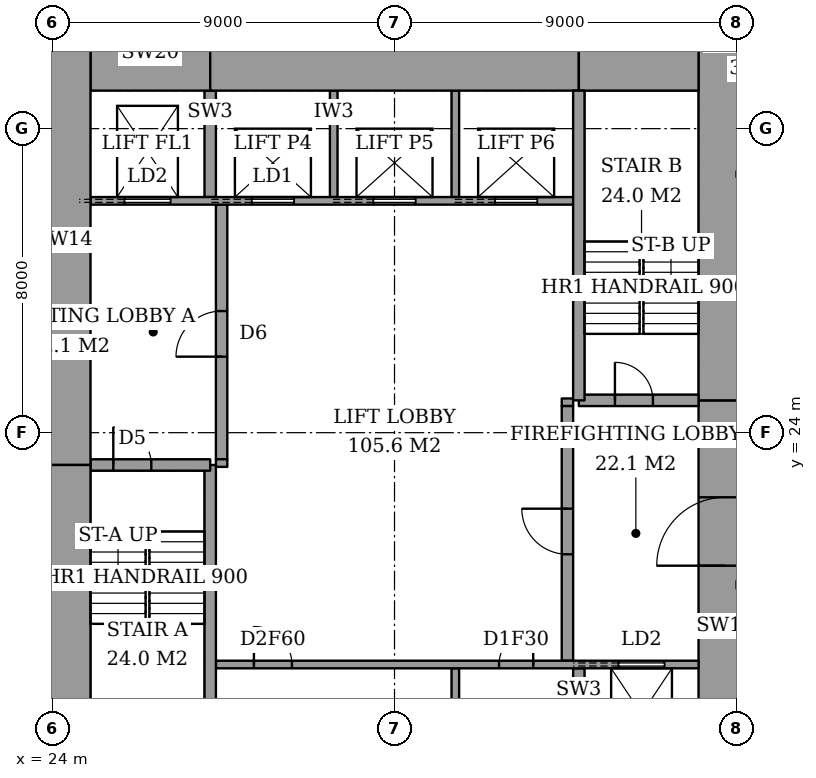
"""IFC4 building model, lengths in metres.
Left out: names, types, materials, properties, quantities, classifications, styles, units other than length and angle.
Written with IfcOpenShell. Run it as: python <this file> out.ifc"""

import sys

from ifc_helpers import new_model, si_unit, direction, frame, frame_2d, origin, place, context, subcontext, project, spatial, rectangle, extrude, element, fill, save


model = new_model("IFC4")
c1 = context("Model", 3, precision=1e-05, world=origin(), true_north=direction((0.0, 1.0)))
c2 = subcontext(c1, "Body", "Model", "MODEL_VIEW")
j1 = project(units=[si_unit("LENGTHUNIT", "METRE"), si_unit("PLANEANGLEUNIT", "RADIAN")], contexts=[c1])
p1 = place(None, origin())
s1 = spatial("IfcSite", under=j1, at=p1, CompositionType="ELEMENT")
p2 = place(p1, origin())
s2 = spatial("IfcBuilding", under=s1, at=p2, CompositionType="ELEMENT")
p3 = place(p2, frame((0.0, 0.0, 262.8)))
s3 = spatial("IfcBuildingStorey", under=s2, at=p3, CompositionType="ELEMENT", Elevation=262.8)
p4 = place(p3, frame((25.0, 34.0, 0.0), z_axis=(0.0, 0.0, 1.0), x_axis=(1.0, 0.0, 0.0)))
e1 = element("IfcWall", 1, at=p4, inside=s3, PredefinedType="SHEAR", context=c2, shape_type="SweptSolid", body=[
    extrude(rectangle(XDim=3.15, YDim=2.0, at=frame_2d((1.575, 0.0))), origin(), (0.0, 0.0, 1.0), 3.6),
])
p5 = place(p3, frame((28.15, 34.0, 0.0), z_axis=(0.0, 0.0, 1.0), x_axis=(1.0, 0.0, 0.0)))
e2 = element("IfcWall", 2, at=p5, inside=s3, PredefinedType="SHEAR", context=c2, shape_type="SweptSolid", body=[
    extrude(rectangle(XDim=9.7, YDim=2.0, at=frame_2d((4.85, 0.0))), origin(), (0.0, 0.0, 1.0), 3.6),
])
p6 = place(p3, frame((37.85, 34.0, 0.0), z_axis=(0.0, 0.0, 1.0), x_axis=(1.0, 0.0, 0.0)))
e3 = element("IfcWall", 3, at=p6, inside=s3, PredefinedType="SHEAR", context=c2, shape_type="SweptSolid", body=[
    extrude(rectangle(XDim=3.15, YDim=2.0, at=frame_2d((1.575, 0.0))), origin(), (0.0, 0.0, 1.0), 3.6),
])
p7 = place(p3, frame((24.3, 13.0, 0.0), z_axis=(0.0, 0.0, 1.0), x_axis=(0.0, 1.0, 0.0)))
e4 = element("IfcWall", 4, at=p7, inside=s3, PredefinedType="SHEAR", context=c2, shape_type="SweptSolid", body=[
    extrude(rectangle(XDim=10.15, YDim=1.4, at=frame_2d((5.075, 0.0))), origin(), (0.0, 0.0, 1.0), 3.6),
])
p8 = place(p3, frame((24.3, 23.15, 0.0), z_axis=(0.0, 0.0, 1.0), x_axis=(0.0, 1.0, 0.0)))
e5 = element("IfcWall", 5, at=p8, inside=s3, PredefinedType="SHEAR", context=c2, shape_type="SweptSolid", body=[
    extrude(rectangle(XDim=11.85, YDim=1.4, at=frame_2d((5.925, 0.0))), origin(), (0.0, 0.0, 1.0), 3.6),
])
p9 = place(p3, frame((41.7, 13.0, 0.0), z_axis=(0.0, 0.0, 1.0), x_axis=(0.0, 1.0, 0.0)))
e6 = element("IfcWall", 6, at=p9, inside=s3, PredefinedType="SHEAR", context=c2, shape_type="SweptSolid", body=[
    extrude(rectangle(XDim=11.85, YDim=1.4, at=frame_2d((5.925, 0.0))), origin(), (0.0, 0.0, 1.0), 3.6),
])
p10 = place(p9, frame((7.5, 0.0, 0.0)))
e7 = element("IfcOpeningElement", 7, at=p10, cuts=e6, PredefinedType="OPENING", context=c2, shape_type="SweptSolid", body=[
    extrude(rectangle(XDim=1.8, YDim=2.4, at=frame_2d((0.9, 1.2))), frame((0.0, 0.71, 0.0), z_axis=(0.0, -1.0, 0.0), x_axis=(1.0, 0.0, 0.0)), (0.0, 0.0, 1.0), 1.42),
])
p11 = place(p3, frame((41.7, 24.85, 0.0), z_axis=(0.0, 0.0, 1.0), x_axis=(0.0, 1.0, 0.0)))
e8 = element("IfcWall", 8, at=p11, inside=s3, PredefinedType="SHEAR", context=c2, shape_type="SweptSolid", body=[
    extrude(rectangle(XDim=10.15, YDim=1.4, at=frame_2d((5.075, 0.0))), origin(), (0.0, 0.0, 1.0), 3.6),
])
p12 = place(p3, frame((28.15, 15.0, 0.0), z_axis=(0.0, 0.0, 1.0), x_axis=(0.0, 1.0, 0.0)))
e9 = element("IfcWall", 9, at=p12, inside=s3, PredefinedType="SHEAR", context=c2, shape_type="SweptSolid", body=[
    extrude(rectangle(XDim=8.15, YDim=0.3, at=frame_2d((4.075, 0.0))), origin(), (0.0, 0.0, 1.0), 3.6),
])
p13 = place(p3, frame((25.0, 23.15, 0.0), z_axis=(0.0, 0.0, 1.0), x_axis=(1.0, 0.0, 0.0)))
e10 = element("IfcWall", 10, at=p13, inside=s3, PredefinedType="SHEAR", context=c2, shape_type="SweptSolid", body=[
    extrude(rectangle(XDim=3.15, YDim=0.3, at=frame_2d((1.575, 0.0))), origin(), (0.0, 0.0, 1.0), 3.6),
])
p14 = place(p13, frame((0.6, 0.0, 0.0)))
e11 = element("IfcOpeningElement", 11, at=p14, cuts=e10, PredefinedType="OPENING", context=c2, shape_type="SweptSolid", body=[
    extrude(rectangle(XDim=1.0, YDim=2.1, at=frame_2d((0.5, 1.05))), frame((0.0, 0.16, 0.0), z_axis=(0.0, -1.0, 0.0), x_axis=(1.0, 0.0, 0.0)), (0.0, 0.0, 1.0), 0.32),
])
p15 = place(p3, frame((37.85, 24.85, 0.0), z_axis=(0.0, 0.0, 1.0), x_axis=(0.0, 1.0, 0.0)))
e12 = element("IfcWall", 12, at=p15, inside=s3, PredefinedType="SHEAR", context=c2, shape_type="SweptSolid", body=[
    extrude(rectangle(XDim=8.15, YDim=0.3, at=frame_2d((4.075, 0.0))), origin(), (0.0, 0.0, 1.0), 3.6),
])
p16 = place(p3, frame((37.85, 24.85, 0.0), z_axis=(0.0, 0.0, 1.0), x_axis=(1.0, 0.0, 0.0)))
e13 = element("IfcWall", 13, at=p16, inside=s3, PredefinedType="SHEAR", context=c2, shape_type="SweptSolid", body=[
    extrude(rectangle(XDim=3.15, YDim=0.3, at=frame_2d((1.575, 0.0))), origin(), (0.0, 0.0, 1.0), 3.6),
])
p17 = place(p16, frame((0.95, 0.0, 0.0)))
e14 = element("IfcOpeningElement", 14, at=p17, cuts=e13, PredefinedType="OPENING", context=c2, shape_type="SweptSolid", body=[
    extrude(rectangle(XDim=1.0, YDim=2.1, at=frame_2d((0.5, 1.05))), frame((0.0, 0.16, 0.0), z_axis=(0.0, -1.0, 0.0), x_axis=(1.0, 0.0, 0.0)), (0.0, 0.0, 1.0), 0.32),
])
p18 = place(p3, frame((28.45, 23.3, 0.0), z_axis=(0.0, 0.0, 1.0), x_axis=(0.0, 1.0, 0.0)))
e15 = element("IfcWall", 15, at=p18, inside=s3, PredefinedType="PARTITIONING", context=c2, shape_type="SweptSolid", body=[
    extrude(rectangle(XDim=6.7, YDim=0.3, at=frame_2d((3.35, 0.0))), origin(), (0.0, 0.0, 1.0), 3.6),
])
p19 = place(p18, frame((2.7, 0.0, 0.0)))
e16 = element("IfcOpeningElement", 16, at=p19, cuts=e15, PredefinedType="OPENING", context=c2, shape_type="SweptSolid", body=[
    extrude(rectangle(XDim=1.2, YDim=2.1, at=frame_2d((0.6, 1.05))), frame((0.0, 0.16, 0.0), z_axis=(0.0, -1.0, 0.0), x_axis=(1.0, 0.0, 0.0)), (0.0, 0.0, 1.0), 0.32),
])
p20 = place(p3, frame((37.55, 18.0, 0.0), z_axis=(0.0, 0.0, 1.0), x_axis=(0.0, 1.0, 0.0)))
e17 = element("IfcWall", 17, at=p20, inside=s3, PredefinedType="PARTITIONING", context=c2, shape_type="SweptSolid", body=[
    extrude(rectangle(XDim=6.7, YDim=0.3, at=frame_2d((3.35, 0.0))), origin(), (0.0, 0.0, 1.0), 3.6),
])
p21 = place(p20, frame((2.8, 0.0, 0.0)))
e18 = element("IfcOpeningElement", 18, at=p21, cuts=e17, PredefinedType="OPENING", context=c2, shape_type="SweptSolid", body=[
    extrude(rectangle(XDim=1.2, YDim=2.1, at=frame_2d((0.6, 1.05))), frame((0.0, 0.16, 0.0), z_axis=(0.0, -1.0, 0.0), x_axis=(1.0, 0.0, 0.0)), (0.0, 0.0, 1.0), 0.32),
])
p22 = place(p3, frame((28.3, 17.9, 0.0), z_axis=(0.0, 0.0, 1.0), x_axis=(1.0, 0.0, 0.0)))
e19 = element("IfcWall", 19, at=p22, inside=s3, PredefinedType="PARTITIONING", context=c2, shape_type="SweptSolid", body=[
    extrude(rectangle(XDim=12.7, YDim=0.2, at=frame_2d((6.35, 0.0))), origin(), (0.0, 0.0, 1.0), 3.6),
])
p23 = place(p22, frame((1.0, 0.0, 0.0)))
e20 = element("IfcOpeningElement", 20, at=p23, cuts=e19, PredefinedType="OPENING", context=c2, shape_type="SweptSolid", body=[
    extrude(rectangle(XDim=1.0, YDim=2.1, at=frame_2d((0.5, 1.05))), frame((0.0, 0.11, 0.0), z_axis=(0.0, -1.0, 0.0), x_axis=(1.0, 0.0, 0.0)), (0.0, 0.0, 1.0), 0.22),
])
p24 = place(p22, frame((7.45, 0.0, 0.0)))
e21 = element("IfcOpeningElement", 21, at=p24, cuts=e19, PredefinedType="OPENING", context=c2, shape_type="SweptSolid", body=[
    extrude(rectangle(XDim=0.9, YDim=2.1, at=frame_2d((0.45, 1.05))), frame((0.0, 0.11, 0.0), z_axis=(0.0, -1.0, 0.0), x_axis=(1.0, 0.0, 0.0)), (0.0, 0.0, 1.0), 0.22),
])
p25 = place(p22, frame((10.6, 0.0, 0.0)))
e22 = element("IfcOpeningElement", 22, at=p25, cuts=e19, PredefinedType="OPENING", context=c2, shape_type="SweptSolid", body=[
    extrude(rectangle(XDim=1.2, YDim=2.1, at=frame_2d((0.6, 1.05))), frame((0.0, 0.11, 0.0), z_axis=(0.0, -1.0, 0.0), x_axis=(1.0, 0.0, 0.0)), (0.0, 0.0, 1.0), 0.22),
])
p26 = place(p3, frame((25.0, 30.1, 0.0), z_axis=(0.0, 0.0, 1.0), x_axis=(1.0, 0.0, 0.0)))
e23 = element("IfcWall", 23, at=p26, inside=s3, PredefinedType="PARTITIONING", context=c2, shape_type="SweptSolid", body=[
    extrude(rectangle(XDim=12.7, YDim=0.2, at=frame_2d((6.35, 0.0))), origin(), (0.0, 0.0, 1.0), 3.6),
])
p27 = place(p26, frame((4.25, 0.0, 0.0)))
e24 = element("IfcOpeningElement", 24, at=p27, cuts=e23, PredefinedType="OPENING", context=c2, shape_type="SweptSolid", body=[
    extrude(rectangle(XDim=1.1, YDim=2.1, at=frame_2d((0.55, 1.05))), frame((0.0, 0.11, 0.0), z_axis=(0.0, -1.0, 0.0), x_axis=(1.0, 0.0, 0.0)), (0.0, 0.0, 1.0), 0.22),
])
p28 = place(p26, frame((7.45, 0.0, 0.0)))
e25 = element("IfcOpeningElement", 25, at=p28, cuts=e23, PredefinedType="OPENING", context=c2, shape_type="SweptSolid", body=[
    extrude(rectangle(XDim=1.1, YDim=2.1, at=frame_2d((0.55, 1.05))), frame((0.0, 0.11, 0.0), z_axis=(0.0, -1.0, 0.0), x_axis=(1.0, 0.0, 0.0)), (0.0, 0.0, 1.0), 0.22),
])
p29 = place(p26, frame((10.65, 0.0, 0.0)))
e26 = element("IfcOpeningElement", 26, at=p29, cuts=e23, PredefinedType="OPENING", context=c2, shape_type="SweptSolid", body=[
    extrude(rectangle(XDim=1.1, YDim=2.1, at=frame_2d((0.55, 1.05))), frame((0.0, 0.11, 0.0), z_axis=(0.0, -1.0, 0.0), x_axis=(1.0, 0.0, 0.0)), (0.0, 0.0, 1.0), 0.22),
])
p30 = place(p26, frame((0.9, 0.0, 0.0)))
e27 = element("IfcOpeningElement", 27, at=p30, cuts=e23, PredefinedType="OPENING", context=c2, shape_type="SweptSolid", body=[
    extrude(rectangle(XDim=1.2, YDim=2.1, at=frame_2d((0.6, 1.05))), frame((0.0, 0.11, 0.0), z_axis=(0.0, -1.0, 0.0), x_axis=(1.0, 0.0, 0.0)), (0.0, 0.0, 1.0), 0.22),
])
p31 = place(p3, frame((34.6, 15.0, 0.0), z_axis=(0.0, 0.0, 1.0), x_axis=(0.0, 1.0, 0.0)))
e28 = element("IfcWall", 28, at=p31, inside=s3, PredefinedType="PARTITIONING", context=c2, shape_type="SweptSolid", body=[
    extrude(rectangle(XDim=2.8, YDim=0.2, at=frame_2d((1.4, 0.0))), origin(), (0.0, 0.0, 1.0), 3.6),
])
p32 = place(p3, frame((37.85, 15.0, 0.0), z_axis=(0.0, 0.0, 1.0), x_axis=(0.0, 1.0, 0.0)))
e29 = element("IfcWall", 29, at=p32, inside=s3, PredefinedType="SHEAR", context=c2, shape_type="SweptSolid", body=[
    extrude(rectangle(XDim=2.8, YDim=0.3, at=frame_2d((1.4, 0.0))), origin(), (0.0, 0.0, 1.0), 3.6),
])
for number, where, z_axis, x_axis in (
    (30, (31.4, 30.2, 0.0), (0.0, 0.0, 1.0), (0.0, 1.0, 0.0)),
    (31, (34.6, 30.2, 0.0), (0.0, 0.0, 1.0), (0.0, 1.0, 0.0)),
):
    element("IfcWall", number, at=place(p3, frame(where, z_axis=z_axis, x_axis=x_axis)), inside=s3, PredefinedType="PARTITIONING", context=c2, shape_type="SweptSolid", body=[
        extrude(rectangle(XDim=2.8, YDim=0.2, at=frame_2d((1.4, 0.0))), origin(), (0.0, 0.0, 1.0), 3.6),
    ])
p33 = place(p3, frame((28.15, 30.2, 0.0), z_axis=(0.0, 0.0, 1.0), x_axis=(0.0, 1.0, 0.0)))
e32 = element("IfcWall", 32, at=p33, inside=s3, PredefinedType="SHEAR", context=c2, shape_type="SweptSolid", body=[
    extrude(rectangle(XDim=2.8, YDim=0.3, at=frame_2d((1.4, 0.0))), origin(), (0.0, 0.0, 1.0), 3.6),
])
for number, where, z_axis, x_axis in (
    (33, (28.3, 23.2, 0.0), (0.0, 0.0, 1.0), (1.0, 0.0, 0.0)),
    (34, (37.4, 24.8, 0.0), (0.0, 0.0, 1.0), (1.0, 0.0, 0.0)),
):
    element("IfcWall", number, at=place(p3, frame(where, z_axis=z_axis, x_axis=x_axis)), inside=s3, PredefinedType="PARTITIONING", context=c2, shape_type="SweptSolid", body=[
        extrude(rectangle(XDim=0.3, YDim=0.2, at=frame_2d((0.15, 0.0))), origin(), (0.0, 0.0, 1.0), 3.6),
    ])
p34 = place(p14, origin())
e35 = element("IfcDoor", 35, at=p34, inside=s3, OperationType="SINGLE_SWING_RIGHT", PredefinedType="DOOR", context=c2, shape_type="SweptSolid", body=[
    extrude(rectangle(XDim=1.0, YDim=2.1, at=frame_2d((0.5, 1.05))), frame((0.0, 0.025, 0.0), z_axis=(0.0, -1.0, 0.0), x_axis=(1.0, 0.0, 0.0)), (0.0, 0.0, 1.0), 0.05),
])
fill(e11, e35)
p35 = place(p17, origin())
e36 = element("IfcDoor", 36, at=p35, inside=s3, OperationType="SINGLE_SWING_RIGHT", PredefinedType="DOOR", context=c2, shape_type="SweptSolid", body=[
    extrude(rectangle(XDim=1.0, YDim=2.1, at=frame_2d((0.5, 1.05))), frame((0.0, 0.025, 0.0), z_axis=(0.0, -1.0, 0.0), x_axis=(1.0, 0.0, 0.0)), (0.0, 0.0, 1.0), 0.05),
])
fill(e14, e36)
p36 = place(p19, origin())
e37 = element("IfcDoor", 37, at=p36, inside=s3, OperationType="SINGLE_SWING_RIGHT", PredefinedType="DOOR", context=c2, shape_type="SweptSolid", body=[
    extrude(rectangle(XDim=1.2, YDim=2.1, at=frame_2d((0.6, 1.05))), frame((0.0, 0.025, 0.0), z_axis=(0.0, -1.0, 0.0), x_axis=(1.0, 0.0, 0.0)), (0.0, 0.0, 1.0), 0.05),
])
fill(e16, e37)
p37 = place(p21, origin())
e38 = element("IfcDoor", 38, at=p37, inside=s3, OperationType="SINGLE_SWING_LEFT", PredefinedType="DOOR", context=c2, shape_type="SweptSolid", body=[
    extrude(rectangle(XDim=1.2, YDim=2.1, at=frame_2d((0.6, 1.05))), frame((0.0, 0.025, 0.0), z_axis=(0.0, -1.0, 0.0), x_axis=(1.0, 0.0, 0.0)), (0.0, 0.0, 1.0), 0.05),
])
fill(e18, e38)
p38 = place(p10, origin())
e39 = element("IfcDoor", 39, at=p38, inside=s3, OperationType="DOUBLE_DOOR_DOUBLE_SWING", PredefinedType="DOOR", context=c2, shape_type="SweptSolid", body=[
    extrude(rectangle(XDim=1.8, YDim=2.4, at=frame_2d((0.9, 1.2))), frame((0.0, 0.025, 0.0), z_axis=(0.0, -1.0, 0.0), x_axis=(1.0, 0.0, 0.0)), (0.0, 0.0, 1.0), 0.05),
])
fill(e7, e39)
p39 = place(p23, origin())
e40 = element("IfcDoor", 40, at=p39, inside=s3, OperationType="SINGLE_SWING_RIGHT", PredefinedType="DOOR", context=c2, shape_type="SweptSolid", body=[
    extrude(rectangle(XDim=1.0, YDim=2.1, at=frame_2d((0.5, 1.05))), frame((0.0, 0.025, 0.0), z_axis=(0.0, -1.0, 0.0), x_axis=(1.0, 0.0, 0.0)), (0.0, 0.0, 1.0), 0.05),
])
fill(e20, e40)
p40 = place(p24, origin())
e41 = element("IfcDoor", 41, at=p40, inside=s3, OperationType="SINGLE_SWING_LEFT", PredefinedType="DOOR", context=c2, shape_type="SweptSolid", body=[
    extrude(rectangle(XDim=0.9, YDim=2.1, at=frame_2d((0.45, 1.05))), frame((0.0, 0.025, 0.0), z_axis=(0.0, -1.0, 0.0), x_axis=(1.0, 0.0, 0.0)), (0.0, 0.0, 1.0), 0.05),
])
fill(e21, e41)
p41 = place(p27, origin())
e42 = element("IfcDoor", 42, at=p41, inside=s3, OperationType="SLIDING_TO_LEFT", PredefinedType="DOOR", context=c2, shape_type="SweptSolid", body=[
    extrude(rectangle(XDim=1.1, YDim=2.1, at=frame_2d((0.55, 1.05))), frame((0.0, 0.025, 0.0), z_axis=(0.0, -1.0, 0.0), x_axis=(1.0, 0.0, 0.0)), (0.0, 0.0, 1.0), 0.05),
])
fill(e24, e42)
p42 = place(p28, origin())
e43 = element("IfcDoor", 43, at=p42, inside=s3, OperationType="SLIDING_TO_LEFT", PredefinedType="DOOR", context=c2, shape_type="SweptSolid", body=[
    extrude(rectangle(XDim=1.1, YDim=2.1, at=frame_2d((0.55, 1.05))), frame((0.0, 0.025, 0.0), z_axis=(0.0, -1.0, 0.0), x_axis=(1.0, 0.0, 0.0)), (0.0, 0.0, 1.0), 0.05),
])
fill(e25, e43)
p43 = place(p29, origin())
e44 = element("IfcDoor", 44, at=p43, inside=s3, OperationType="SLIDING_TO_LEFT", PredefinedType="DOOR", context=c2, shape_type="SweptSolid", body=[
    extrude(rectangle(XDim=1.1, YDim=2.1, at=frame_2d((0.55, 1.05))), frame((0.0, 0.025, 0.0), z_axis=(0.0, -1.0, 0.0), x_axis=(1.0, 0.0, 0.0)), (0.0, 0.0, 1.0), 0.05),
])
fill(e26, e44)
p44 = place(p30, origin())
e45 = element("IfcDoor", 45, at=p44, inside=s3, OperationType="SLIDING_TO_LEFT", PredefinedType="DOOR", context=c2, shape_type="SweptSolid", body=[
    extrude(rectangle(XDim=1.2, YDim=2.1, at=frame_2d((0.6, 1.05))), frame((0.0, 0.025, 0.0), z_axis=(0.0, -1.0, 0.0), x_axis=(1.0, 0.0, 0.0)), (0.0, 0.0, 1.0), 0.05),
])
fill(e27, e45)
p45 = place(p25, origin())
e46 = element("IfcDoor", 46, at=p45, inside=s3, OperationType="SLIDING_TO_LEFT", PredefinedType="DOOR", context=c2, shape_type="SweptSolid", body=[
    extrude(rectangle(XDim=1.2, YDim=2.1, at=frame_2d((0.6, 1.05))), frame((0.0, 0.025, 0.0), z_axis=(0.0, -1.0, 0.0), x_axis=(1.0, 0.0, 0.0)), (0.0, 0.0, 1.0), 0.05),
])
fill(e22, e46)
save(model, sys.argv[1])
